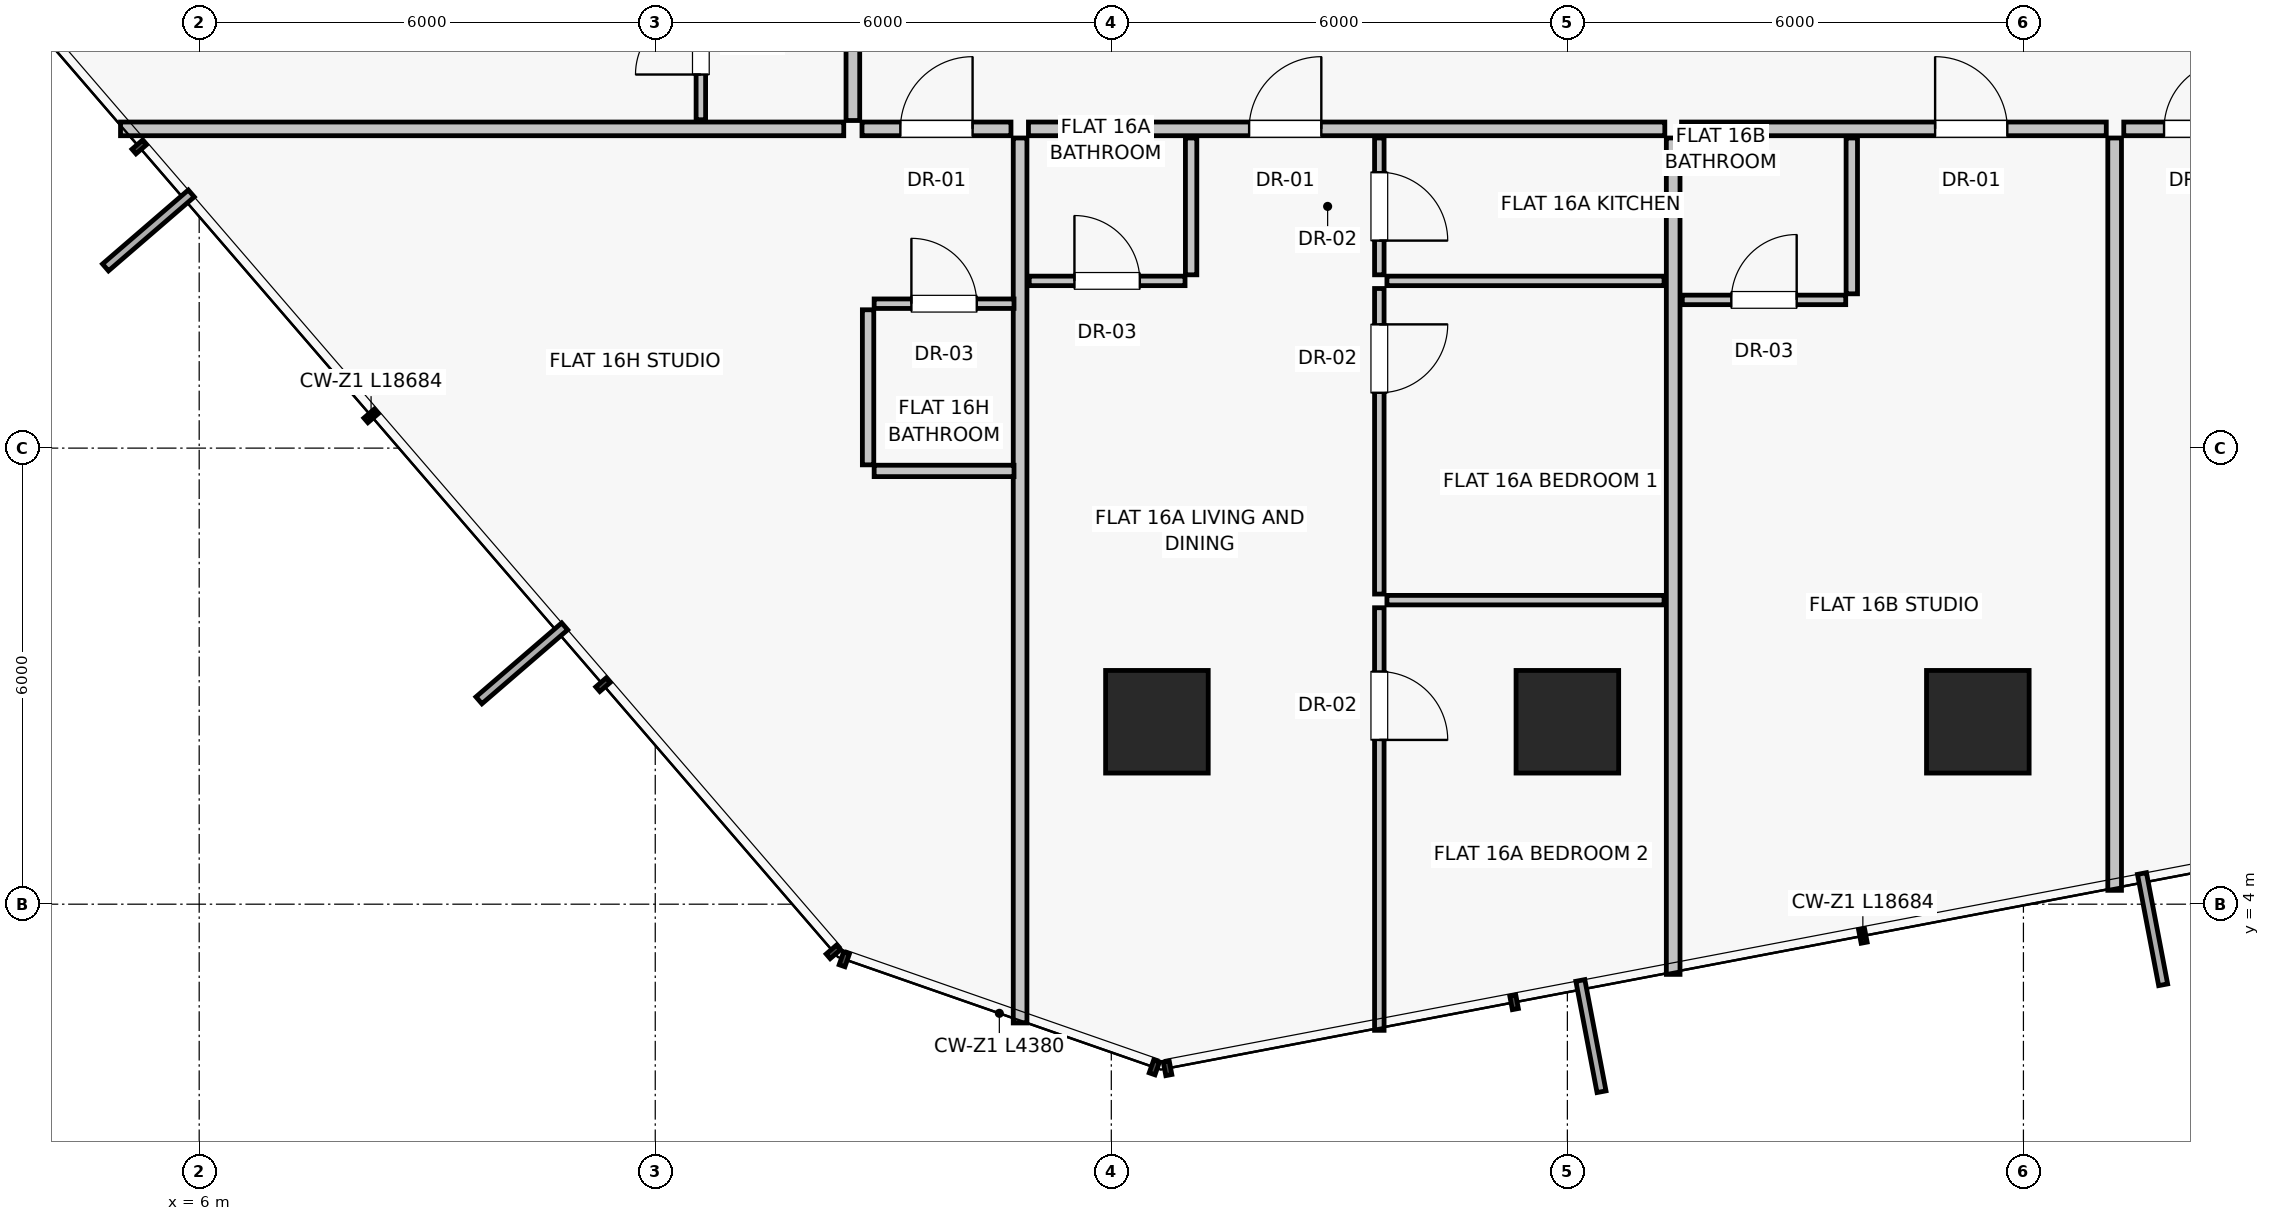
"""IFC4 building model, lengths in metres.
Left out: names, types, materials, properties, quantities, classifications, styles, units other than length and angle.
Written with IfcOpenShell. Run it as: python <this file> out.ifc"""

import sys

from ifc_helpers import new_model, si_unit, direction, frame, frame_2d, origin, origin_2d, place, context, subcontext, project, spatial, rectangle, extrude, source, transform, mapped, element, fill, save


model = new_model("IFC4")
c1 = context("Model", 3, precision=1e-05, world=origin(), true_north=direction((0.0, 1.0)))
c2 = subcontext(c1, "Body", "Model", "MODEL_VIEW")
j1 = project(units=[si_unit("LENGTHUNIT", "METRE"), si_unit("PLANEANGLEUNIT", "RADIAN")], contexts=[c1])
p1 = place(None, origin())
s1 = spatial("IfcSite", under=j1, at=p1, CompositionType="ELEMENT")
p2 = place(p1, origin())
s2 = spatial("IfcBuilding", under=s1, at=p2, CompositionType="ELEMENT")
p3 = place(p2, frame((0.0, 0.0, 60.85)))
s3 = spatial("IfcBuildingStorey", under=s2, at=p3, CompositionType="ELEMENT", Elevation=60.85)
for number, where, z_axis, x_axis in (
    (1, (18.6, 6.4, 0.0), (0.0, 0.0, 1.0), (1.0, 0.0, 0.0)),
    (2, (24.0, 6.4, 0.0), (0.0, 0.0, 1.0), (1.0, 0.0, 0.0)),
    (3, (29.4, 6.4, 0.0), (0.0, 0.0, 1.0), (1.0, 0.0, 0.0)),
):
    element("IfcColumn", number, at=place(p3, frame(where, z_axis=z_axis, x_axis=x_axis)), inside=s3, PredefinedType="COLUMN", context=c2, shape_type="SweptSolid", body=[
        extrude(rectangle(XDim=1.35, YDim=1.35, at=origin_2d()), origin(), (0.0, 0.0, 1.0), 3.25),
    ])
p4 = place(p3, frame((16.8, 14.08, 0.0), z_axis=(0.0, 0.0, 1.0), x_axis=(0.0, -1.0, 0.0)))
e4 = element("IfcWall", 4, at=p4, inside=s3, PredefinedType="PARTITIONING", context=c2, shape_type="SweptSolid", body=[
    extrude(rectangle(XDim=11.643, YDim=0.18, at=frame_2d((5.821, 0.0))), origin(), (0.0, 0.0, 1.0), 3.0),
])
p5 = place(p3, frame((31.2, 14.08, 0.0), z_axis=(0.0, 0.0, 1.0), x_axis=(0.0, -1.0, 0.0)))
e5 = element("IfcWall", 5, at=p5, inside=s3, PredefinedType="PARTITIONING", context=c2, shape_type="SweptSolid", body=[
    extrude(rectangle(XDim=9.898, YDim=0.18, at=frame_2d((4.949, 0.0))), origin(), (0.0, 0.0, 1.0), 3.0),
])
p6 = place(p3, frame((16.91, 14.2, 0.0), z_axis=(0.0, 0.0, 1.0), x_axis=(1.0, 0.0, 0.0)))
e6 = element("IfcWall", 6, at=p6, inside=s3, PredefinedType="PARTITIONING", context=c2, shape_type="SweptSolid", body=[
    extrude(rectangle(XDim=8.372, YDim=0.18, at=frame_2d((4.186, 0.0))), origin(), (0.0, 0.0, 1.0), 3.0),
])
p7 = place(p6, frame((2.903, 0.0, 0.0)))
e7 = element("IfcOpeningElement", 7, at=p7, cuts=e6, PredefinedType="OPENING", context=c2, shape_type="SweptSolid", body=[
    extrude(rectangle(XDim=0.95, YDim=2.02, at=frame_2d((0.475, 1.01))), frame((0.0, 0.1, 0.0), z_axis=(0.0, -1.0, 0.0), x_axis=(1.0, 0.0, 0.0)), (0.0, 0.0, 1.0), 0.2),
])
p8 = place(p3, frame((19.05, 14.08, 0.0), z_axis=(0.0, 0.0, 1.0), x_axis=(0.0, -1.0, 0.0)))
e8 = element("IfcWall", 8, at=p8, inside=s3, PredefinedType="PARTITIONING", context=c2, shape_type="SweptSolid", body=[
    extrude(rectangle(XDim=1.8, YDim=0.15, at=frame_2d((0.9, 0.0))), origin(), (0.0, 0.0, 1.0), 3.0),
])
p9 = place(p3, frame((16.92, 12.2, 0.0), z_axis=(0.0, 0.0, 1.0), x_axis=(1.0, 0.0, 0.0)))
e9 = element("IfcWall", 9, at=p9, inside=s3, PredefinedType="PARTITIONING", context=c2, shape_type="SweptSolid", body=[
    extrude(rectangle(XDim=2.05, YDim=0.125, at=frame_2d((1.025, 0.0))), origin(), (0.0, 0.0, 1.0), 3.0),
])
p10 = place(p9, frame((0.595, 0.0, 0.0)))
e10 = element("IfcOpeningElement", 10, at=p10, cuts=e9, PredefinedType="OPENING", context=c2, shape_type="SweptSolid", body=[
    extrude(rectangle(XDim=0.86, YDim=2.01, at=frame_2d((0.43, 1.005))), frame((0.0, 0.073, 0.0), z_axis=(0.0, -1.0, 0.0), x_axis=(1.0, 0.0, 0.0)), (0.0, 0.0, 1.0), 0.145),
])
p11 = place(p3, frame((21.526, 14.08, 0.0), z_axis=(0.0, 0.0, 1.0), x_axis=(0.0, -1.0, 0.0)))
e11 = element("IfcWall", 11, at=p11, inside=s3, PredefinedType="PARTITIONING", context=c2, shape_type="SweptSolid", body=[
    extrude(rectangle(XDim=1.8, YDim=0.125, at=frame_2d((0.9, 0.0))), origin(), (0.0, 0.0, 1.0), 3.0),
])
p12 = place(p11, frame((0.45, 0.0, 0.0)))
e12 = element("IfcOpeningElement", 12, at=p12, cuts=e11, PredefinedType="OPENING", context=c2, shape_type="SweptSolid", body=[
    extrude(rectangle(XDim=0.9, YDim=2.01, at=frame_2d((0.45, 1.005))), frame((0.0, 0.073, 0.0), z_axis=(0.0, -1.0, 0.0), x_axis=(1.0, 0.0, 0.0)), (0.0, 0.0, 1.0), 0.145),
])
for number, where, z_axis, x_axis in (
    (13, (21.626, 12.2, 0.0), (0.0, 0.0, 1.0), (1.0, 0.0, 0.0)),
    (14, (21.626, 8.0, 0.0), (0.0, 0.0, 1.0), (1.0, 0.0, 0.0)),
):
    element("IfcWall", number, at=place(p3, frame(where, z_axis=z_axis, x_axis=x_axis)), inside=s3, PredefinedType="PARTITIONING", context=c2, shape_type="SweptSolid", body=[
        extrude(rectangle(XDim=3.646, YDim=0.125, at=frame_2d((1.823, 0.0))), origin(), (0.0, 0.0, 1.0), 3.0),
    ])
p13 = place(p3, frame((21.526, 12.1, 0.0), z_axis=(0.0, 0.0, 1.0), x_axis=(0.0, -1.0, 0.0)))
e15 = element("IfcWall", 15, at=p13, inside=s3, PredefinedType="PARTITIONING", context=c2, shape_type="SweptSolid", body=[
    extrude(rectangle(XDim=4.02, YDim=0.125, at=frame_2d((2.01, 0.0))), origin(), (0.0, 0.0, 1.0), 3.0),
])
p14 = place(p13, frame((0.472, 0.0, 0.0)))
e16 = element("IfcOpeningElement", 16, at=p14, cuts=e15, PredefinedType="OPENING", context=c2, shape_type="SweptSolid", body=[
    extrude(rectangle(XDim=0.9, YDim=2.01, at=frame_2d((0.45, 1.005))), frame((0.0, 0.073, 0.0), z_axis=(0.0, -1.0, 0.0), x_axis=(1.0, 0.0, 0.0)), (0.0, 0.0, 1.0), 0.145),
])
p15 = place(p3, frame((21.526, 7.9, 0.0), z_axis=(0.0, 0.0, 1.0), x_axis=(0.0, -1.0, 0.0)))
e17 = element("IfcWall", 17, at=p15, inside=s3, PredefinedType="PARTITIONING", context=c2, shape_type="SweptSolid", body=[
    extrude(rectangle(XDim=5.559, YDim=0.125, at=frame_2d((2.78, 0.0))), origin(), (0.0, 0.0, 1.0), 3.0),
])
p16 = place(p15, frame((0.839, 0.0, 0.0)))
e18 = element("IfcOpeningElement", 18, at=p16, cuts=e17, PredefinedType="OPENING", context=c2, shape_type="SweptSolid", body=[
    extrude(rectangle(XDim=0.9, YDim=2.01, at=frame_2d((0.45, 1.005))), frame((0.0, 0.073, 0.0), z_axis=(0.0, -1.0, 0.0), x_axis=(1.0, 0.0, 0.0)), (0.0, 0.0, 1.0), 0.145),
])
p17 = place(p3, frame((25.392, 14.08, 0.0), z_axis=(0.0, 0.0, 1.0), x_axis=(0.0, -1.0, 0.0)))
e19 = element("IfcWall", 19, at=p17, inside=s3, PredefinedType="PARTITIONING", context=c2, shape_type="SweptSolid", body=[
    extrude(rectangle(XDim=11.004, YDim=0.18, at=frame_2d((5.502, 0.0))), origin(), (0.0, 0.0, 1.0), 3.0),
])
p18 = place(p3, frame((25.502, 14.2, 0.0), z_axis=(0.0, 0.0, 1.0), x_axis=(1.0, 0.0, 0.0)))
e20 = element("IfcWall", 20, at=p18, inside=s3, PredefinedType="PARTITIONING", context=c2, shape_type="SweptSolid", body=[
    extrude(rectangle(XDim=5.588, YDim=0.18, at=frame_2d((2.794, 0.0))), origin(), (0.0, 0.0, 1.0), 3.0),
])
p19 = place(p18, frame((3.336, 0.0, 0.0)))
e21 = element("IfcOpeningElement", 21, at=p19, cuts=e20, PredefinedType="OPENING", context=c2, shape_type="SweptSolid", body=[
    extrude(rectangle(XDim=0.95, YDim=2.02, at=frame_2d((0.475, 1.01))), frame((0.0, 0.1, 0.0), z_axis=(0.0, -1.0, 0.0), x_axis=(1.0, 0.0, 0.0)), (0.0, 0.0, 1.0), 0.2),
])
p20 = place(p3, frame((27.742, 14.08, 0.0), z_axis=(0.0, 0.0, 1.0), x_axis=(0.0, -1.0, 0.0)))
e22 = element("IfcWall", 22, at=p20, inside=s3, PredefinedType="PARTITIONING", context=c2, shape_type="SweptSolid", body=[
    extrude(rectangle(XDim=2.05, YDim=0.15, at=frame_2d((1.025, 0.0))), origin(), (0.0, 0.0, 1.0), 3.0),
])
p21 = place(p3, frame((25.512, 11.95, 0.0), z_axis=(0.0, 0.0, 1.0), x_axis=(1.0, 0.0, 0.0)))
e23 = element("IfcWall", 23, at=p21, inside=s3, PredefinedType="PARTITIONING", context=c2, shape_type="SweptSolid", body=[
    extrude(rectangle(XDim=2.15, YDim=0.125, at=frame_2d((1.075, 0.0))), origin(), (0.0, 0.0, 1.0), 2.58),
])
p22 = place(p21, frame((0.645, 0.0, 0.0)))
e24 = element("IfcOpeningElement", 24, at=p22, cuts=e23, PredefinedType="OPENING", context=c2, shape_type="SweptSolid", body=[
    extrude(rectangle(XDim=0.86, YDim=2.01, at=frame_2d((0.43, 1.005))), frame((0.0, 0.073, 0.0), z_axis=(0.0, -1.0, 0.0), x_axis=(1.0, 0.0, 0.0)), (0.0, 0.0, 1.0), 0.145),
])
p23 = place(p3, frame((14.48, 14.2, 0.0), z_axis=(0.0, 0.0, 1.0), x_axis=(-1.0, 0.0, 0.0)))
e25 = element("IfcWall", 25, at=p23, inside=s3, PredefinedType="PARTITIONING", context=c2, shape_type="SweptSolid", body=[
    extrude(rectangle(XDim=9.515, YDim=0.18, at=frame_2d((4.757, 0.0))), origin(), (0.0, 0.0, 1.0), 3.0),
])
p24 = place(p3, frame((14.6, 14.31, 0.0), z_axis=(0.0, 0.0, 1.0), x_axis=(0.0, 1.0, 0.0)))
e26 = element("IfcWall", 26, at=p24, inside=s3, PredefinedType="PARTITIONING", context=c2, shape_type="SweptSolid", body=[
    extrude(rectangle(XDim=11.438, YDim=0.18, at=frame_2d((5.719, 0.0))), origin(), (0.0, 0.0, 1.0), 3.0),
])
p25 = place(p24, frame((3.804, 0.0, 0.0)))
e27 = element("IfcOpeningElement", 27, at=p25, cuts=e26, PredefinedType="OPENING", context=c2, shape_type="SweptSolid", body=[
    extrude(rectangle(XDim=0.95, YDim=2.02, at=frame_2d((0.475, 1.01))), frame((0.0, 0.1, 0.0), z_axis=(0.0, -1.0, 0.0), x_axis=(1.0, 0.0, 0.0)), (0.0, 0.0, 1.0), 0.2),
])
p26 = place(p3, frame((12.6, 14.32, 0.0), z_axis=(0.0, 0.0, 1.0), x_axis=(0.0, 1.0, 0.0)))
e28 = element("IfcWall", 28, at=p26, inside=s3, PredefinedType="PARTITIONING", context=c2, shape_type="SweptSolid", body=[
    extrude(rectangle(XDim=2.05, YDim=0.125, at=frame_2d((1.025, 0.0))), origin(), (0.0, 0.0, 1.0), 3.0),
])
p27 = place(p26, frame((0.595, 0.0, 0.0)))
e29 = element("IfcOpeningElement", 29, at=p27, cuts=e28, PredefinedType="OPENING", context=c2, shape_type="SweptSolid", body=[
    extrude(rectangle(XDim=0.86, YDim=2.01, at=frame_2d((0.43, 1.005))), frame((0.0, 0.073, 0.0), z_axis=(0.0, -1.0, 0.0), x_axis=(1.0, 0.0, 0.0)), (0.0, 0.0, 1.0), 0.145),
])
p28 = place(p3, frame((14.72, 14.2, 0.0), z_axis=(0.0, 0.0, 1.0), x_axis=(1.0, 0.0, 0.0)))
e30 = element("IfcWall", 30, at=p28, inside=s3, PredefinedType="PARTITIONING", context=c2, shape_type="SweptSolid", body=[
    extrude(rectangle(XDim=1.96, YDim=0.18, at=frame_2d((0.98, 0.0))), origin(), (0.0, 0.0, 1.0), 3.0),
])
p29 = place(p28, frame((0.505, 0.0, 0.0)))
e31 = element("IfcOpeningElement", 31, at=p29, cuts=e30, PredefinedType="OPENING", context=c2, shape_type="SweptSolid", body=[
    extrude(rectangle(XDim=0.95, YDim=2.02, at=frame_2d((0.475, 1.01))), frame((0.0, 0.1, 0.0), z_axis=(0.0, -1.0, 0.0), x_axis=(1.0, 0.0, 0.0)), (0.0, 0.0, 1.0), 0.2),
])
p30 = place(p3, frame((14.88, 11.9, 0.0), z_axis=(0.0, 0.0, 1.0), x_axis=(1.0, 0.0, 0.0)))
e32 = element("IfcWall", 32, at=p30, inside=s3, PredefinedType="PARTITIONING", context=c2, shape_type="SweptSolid", body=[
    extrude(rectangle(XDim=1.84, YDim=0.125, at=frame_2d((0.92, 0.0))), origin(), (0.0, 0.0, 1.0), 3.0),
])
p31 = place(p30, frame((0.49, 0.0, 0.0)))
e33 = element("IfcOpeningElement", 33, at=p31, cuts=e32, PredefinedType="OPENING", context=c2, shape_type="SweptSolid", body=[
    extrude(rectangle(XDim=0.86, YDim=2.01, at=frame_2d((0.43, 1.005))), frame((0.0, 0.073, 0.0), z_axis=(0.0, -1.0, 0.0), x_axis=(1.0, 0.0, 0.0)), (0.0, 0.0, 1.0), 0.145),
])
p32 = place(p3, frame((14.88, 9.7, 0.0), z_axis=(0.0, 0.0, 1.0), x_axis=(1.0, 0.0, 0.0)))
e34 = element("IfcWall", 34, at=p32, inside=s3, PredefinedType="PARTITIONING", context=c2, shape_type="SweptSolid", body=[
    extrude(rectangle(XDim=1.84, YDim=0.15, at=frame_2d((0.92, 0.0))), origin(), (0.0, 0.0, 1.0), 3.0),
])
p33 = place(p3, frame((14.8, 9.78, 0.0), z_axis=(0.0, 0.0, 1.0), x_axis=(0.0, 1.0, 0.0)))
e35 = element("IfcWall", 35, at=p33, inside=s3, PredefinedType="PARTITIONING", context=c2, shape_type="SweptSolid", body=[
    extrude(rectangle(XDim=2.04, YDim=0.15, at=frame_2d((1.02, 0.0))), origin(), (0.0, 0.0, 1.0), 3.0),
])
p34 = place(p3, frame((31.32, 14.2, 0.0), z_axis=(0.0, 0.0, 1.0), x_axis=(1.0, 0.0, 0.0)))
e36 = element("IfcWall", 36, at=p34, inside=s3, PredefinedType="PARTITIONING", context=c2, shape_type="SweptSolid", body=[
    extrude(rectangle(XDim=1.96, YDim=0.18, at=frame_2d((0.98, 0.0))), origin(), (0.0, 0.0, 1.0), 3.0),
])
p35 = place(p34, frame((0.53, 0.0, 0.0)))
e37 = element("IfcOpeningElement", 37, at=p35, cuts=e36, PredefinedType="OPENING", context=c2, shape_type="SweptSolid", body=[
    extrude(rectangle(XDim=0.9, YDim=2.01, at=frame_2d((0.45, 1.005))), frame((0.0, 0.1, 0.0), z_axis=(0.0, -1.0, 0.0), x_axis=(1.0, 0.0, 0.0)), (0.0, 0.0, 1.0), 0.2),
])
m1 = source(origin(), c2, "Body", "SweptSolid", [
    extrude(rectangle(XDim=0.95, YDim=2.02, at=frame_2d((0.475, 1.01))), frame((0.0, 0.025, 0.0), z_axis=(0.0, -1.0, 0.0), x_axis=(1.0, 0.0, 0.0)), (0.0, 0.0, 1.0), 0.05),
])
p36 = place(p7, origin())
e38 = element("IfcDoor", 38, at=p36, inside=s3, OperationType="SINGLE_SWING_RIGHT", PredefinedType="DOOR", context=c2, shape_type="MappedRepresentation", body=[
    mapped(m1, transform((0.0, 0.0, 0.0), scale=1.0)),
])
fill(e7, e38)
m2 = source(origin(), c2, "Body", "SweptSolid", [
    extrude(rectangle(XDim=0.86, YDim=2.01, at=frame_2d((0.43, 1.005))), frame((0.0, 0.025, 0.0), z_axis=(0.0, -1.0, 0.0), x_axis=(1.0, 0.0, 0.0)), (0.0, 0.0, 1.0), 0.05),
])
p37 = place(p10, origin())
e39 = element("IfcDoor", 39, at=p37, inside=s3, OperationType="SINGLE_SWING_LEFT", PredefinedType="DOOR", context=c2, shape_type="MappedRepresentation", body=[
    mapped(m2, transform((0.0, 0.0, 0.0), scale=1.0)),
])
fill(e10, e39)
m3 = source(origin(), c2, "Body", "SweptSolid", [
    extrude(rectangle(XDim=0.9, YDim=2.01, at=frame_2d((0.45, 1.005))), frame((0.0, 0.025, 0.0), z_axis=(0.0, -1.0, 0.0), x_axis=(1.0, 0.0, 0.0)), (0.0, 0.0, 1.0), 0.05),
])
p38 = place(p12, origin())
e40 = element("IfcDoor", 40, at=p38, inside=s3, OperationType="SINGLE_SWING_RIGHT", PredefinedType="DOOR", context=c2, shape_type="MappedRepresentation", body=[
    mapped(m3, transform((0.0, 0.0, 0.0), scale=1.0)),
])
fill(e12, e40)
p39 = place(p14, origin())
e41 = element("IfcDoor", 41, at=p39, inside=s3, OperationType="SINGLE_SWING_LEFT", PredefinedType="DOOR", context=c2, shape_type="MappedRepresentation", body=[
    mapped(m3, transform((0.0, 0.0, 0.0), scale=1.0)),
])
fill(e16, e41)
p40 = place(p16, origin())
e42 = element("IfcDoor", 42, at=p40, inside=s3, OperationType="SINGLE_SWING_RIGHT", PredefinedType="DOOR", context=c2, shape_type="MappedRepresentation", body=[
    mapped(m3, transform((0.0, 0.0, 0.0), scale=1.0)),
])
fill(e18, e42)
p41 = place(p19, origin())
e43 = element("IfcDoor", 43, at=p41, inside=s3, OperationType="SINGLE_SWING_LEFT", PredefinedType="DOOR", context=c2, shape_type="MappedRepresentation", body=[
    mapped(m1, transform((0.0, 0.0, 0.0), scale=1.0)),
])
fill(e21, e43)
p42 = place(p22, origin())
e44 = element("IfcDoor", 44, at=p42, inside=s3, OperationType="SINGLE_SWING_RIGHT", PredefinedType="DOOR", context=c2, shape_type="MappedRepresentation", body=[
    mapped(m2, transform((0.0, 0.0, 0.0), scale=1.0)),
])
fill(e24, e44)
p43 = place(p27, origin())
e45 = element("IfcDoor", 45, at=p43, inside=s3, OperationType="SINGLE_SWING_LEFT", PredefinedType="DOOR", context=c2, shape_type="MappedRepresentation", body=[
    mapped(m2, transform((0.0, 0.0, 0.0), scale=1.0)),
])
fill(e29, e45)
p44 = place(p29, origin())
e46 = element("IfcDoor", 46, at=p44, inside=s3, OperationType="SINGLE_SWING_RIGHT", PredefinedType="DOOR", context=c2, shape_type="MappedRepresentation", body=[
    mapped(m1, transform((0.0, 0.0, 0.0), scale=1.0)),
])
fill(e31, e46)
p45 = place(p31, origin())
e47 = element("IfcDoor", 47, at=p45, inside=s3, OperationType="SINGLE_SWING_LEFT", PredefinedType="DOOR", context=c2, shape_type="MappedRepresentation", body=[
    mapped(m2, transform((0.0, 0.0, 0.0), scale=1.0)),
])
fill(e33, e47)
p46 = place(p35, origin())
e48 = element("IfcDoor", 48, at=p46, inside=s3, OperationType="SINGLE_SWING_RIGHT", PredefinedType="DOOR", context=c2, shape_type="MappedRepresentation", body=[
    mapped(m3, transform((0.0, 0.0, 0.0), scale=1.0)),
])
fill(e37, e48)
save(model, sys.argv[1])
